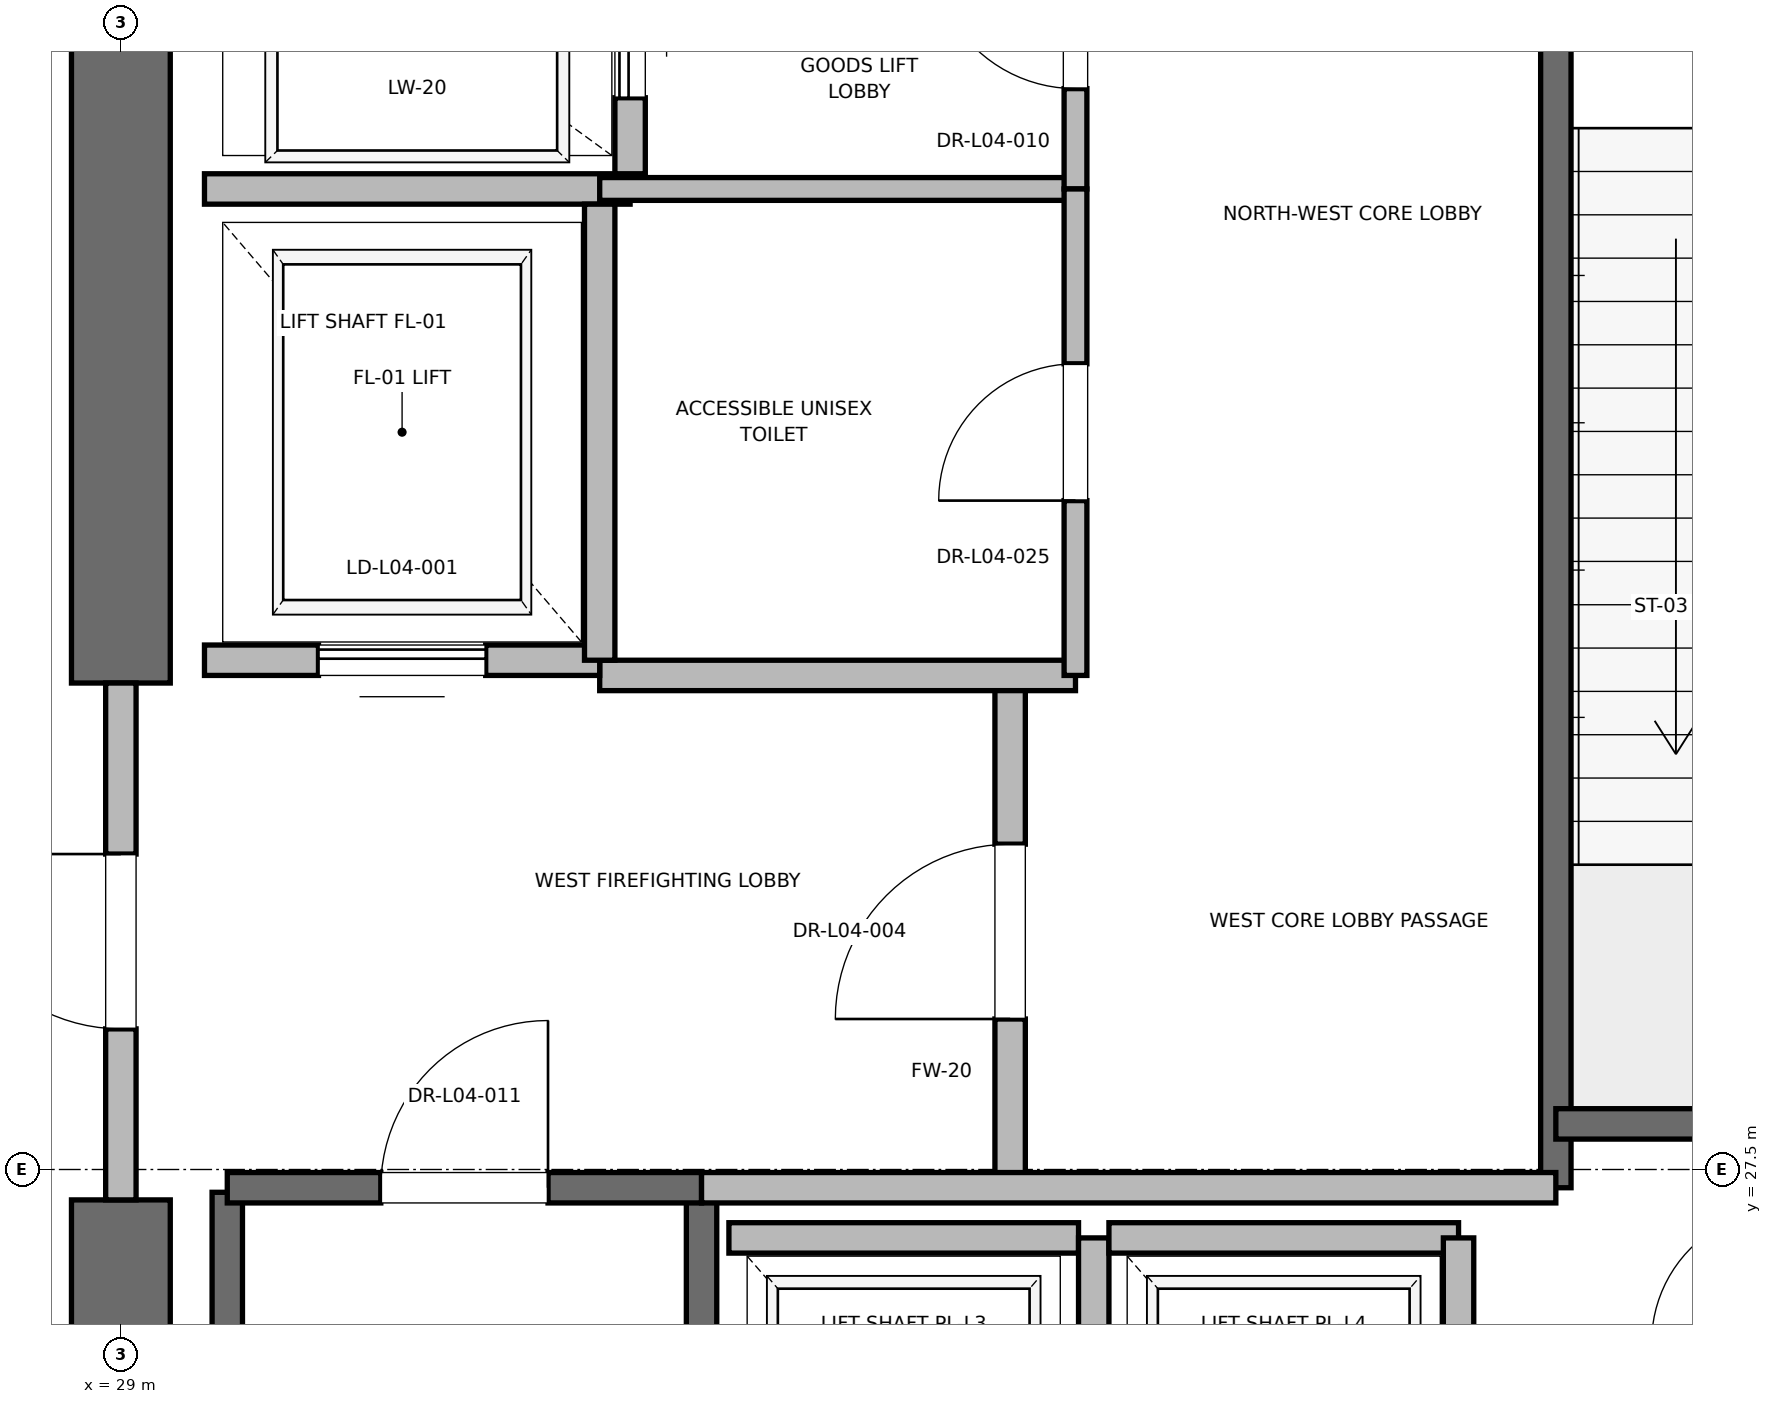
"""IFC4 building model, lengths in metres.
Left out: names, types, materials, properties, quantities, classifications, styles, units other than length and angle.
Written with IfcOpenShell. Run it as: python <this file> out.ifc"""

import sys

from ifc_helpers import new_model, si_unit, direction, frame, frame_2d, origin, place, context, subcontext, project, spatial, rectangle, extrude, element, fill, save


model = new_model("IFC4")
c1 = context("Model", 3, precision=1e-05, world=origin(), true_north=direction((0.0, 1.0)))
c2 = subcontext(c1, "Body", "Model", "MODEL_VIEW")
j1 = project(units=[si_unit("LENGTHUNIT", "METRE"), si_unit("PLANEANGLEUNIT", "RADIAN")], contexts=[c1])
p1 = place(None, origin())
s1 = spatial("IfcSite", under=j1, at=p1, CompositionType="ELEMENT")
p2 = place(p1, origin())
s2 = spatial("IfcBuilding", under=s1, at=p2, CompositionType="ELEMENT")
p3 = place(p2, frame((0.0, 0.0, 21.6)))
s3 = spatial("IfcBuildingStorey", under=s2, at=p3, CompositionType="ELEMENT", Elevation=21.6)
p4 = place(p3, frame((29.0, 18.5, 0.0), z_axis=(0.0, 0.0, 1.0), x_axis=(0.0, 1.0, 0.0)))
e1 = element("IfcWall", 1, at=p4, inside=s3, PredefinedType="SHEAR", context=c2, shape_type="SweptSolid", body=[
    extrude(rectangle(XDim=8.8, YDim=0.65, at=frame_2d((4.4, 0.0))), origin(), (0.0, 0.0, 1.0), 5.76),
])
p5 = place(p3, frame((29.0, 30.7, 0.0), z_axis=(0.0, 0.0, 1.0), x_axis=(0.0, 1.0, 0.0)))
e2 = element("IfcWall", 2, at=p5, inside=s3, PredefinedType="SHEAR", context=c2, shape_type="SweptSolid", body=[
    extrude(rectangle(XDim=5.8, YDim=0.65, at=frame_2d((2.9, 0.0))), origin(), (0.0, 0.0, 1.0), 5.76),
])
p6 = place(p3, frame((29.7, 19.2, 0.0), z_axis=(0.0, 0.0, 1.0), x_axis=(0.0, 1.0, 0.0)))
e3 = element("IfcWall", 3, at=p6, inside=s3, PredefinedType="SOLIDWALL", context=c2, shape_type="SweptSolid", body=[
    extrude(rectangle(XDim=8.15, YDim=0.2, at=frame_2d((4.075, 0.0))), origin(), (0.0, 0.0, 1.0), 5.76),
])
p7 = place(p3, frame((32.82, 18.6, 0.0), z_axis=(0.0, 0.0, 1.0), x_axis=(0.0, 1.0, 0.0)))
e4 = element("IfcWall", 4, at=p7, inside=s3, PredefinedType="SOLIDWALL", context=c2, shape_type="SweptSolid", body=[
    extrude(rectangle(XDim=8.78, YDim=0.2, at=frame_2d((4.39, 0.0))), origin(), (0.0, 0.0, 1.0), 5.76),
])
p8 = place(p3, frame((29.7, 27.38, 0.0), z_axis=(0.0, 0.0, 1.0), x_axis=(1.0, 0.0, 0.0)))
e5 = element("IfcWall", 5, at=p8, inside=s3, PredefinedType="SOLIDWALL", context=c2, shape_type="SweptSolid", body=[
    extrude(rectangle(XDim=3.12, YDim=0.2, at=frame_2d((1.56, 0.0))), origin(), (0.0, 0.0, 1.0), 5.76),
])
p9 = place(p8, frame((1.01, 0.0, 0.0)))
e6 = element("IfcOpeningElement", 6, at=p9, cuts=e5, PredefinedType="OPENING", context=c2, shape_type="SweptSolid", body=[
    extrude(rectangle(XDim=1.1, YDim=2.15, at=frame_2d((0.55, 1.075))), frame((0.0, 0.1, 0.0), z_axis=(0.0, -1.0, 0.0), x_axis=(1.0, 0.0, 0.0)), (0.0, 0.0, 1.0), 0.2),
])
p10 = place(p3, frame((38.44, 27.38, 0.0), z_axis=(0.0, 0.0, 1.0), x_axis=(0.0, 1.0, 0.0)))
e7 = element("IfcWall", 7, at=p10, inside=s3, PredefinedType="SOLIDWALL", context=c2, shape_type="SweptSolid", body=[
    extrude(rectangle(XDim=8.87, YDim=0.2, at=frame_2d((4.435, 0.0))), origin(), (0.0, 0.0, 1.0), 5.76),
])
p11 = place(p3, frame((38.44, 27.8, 0.0), z_axis=(0.0, 0.0, 1.0), x_axis=(1.0, 0.0, 0.0)))
e8 = element("IfcWall", 8, at=p11, inside=s3, PredefinedType="SOLIDWALL", context=c2, shape_type="SweptSolid", body=[
    extrude(rectangle(XDim=3.32, YDim=0.2, at=frame_2d((1.66, 0.0))), origin(), (0.0, 0.0, 1.0), 5.76),
])
p12 = place(p3, frame((34.85, 27.38, 0.0), z_axis=(0.0, 0.0, 1.0), x_axis=(0.0, 1.0, 0.0)))
e9 = element("IfcWall", 9, at=p12, inside=s3, PredefinedType="PARTITIONING", context=c2, shape_type="SweptSolid", body=[
    extrude(rectangle(XDim=3.37, YDim=0.2, at=frame_2d((1.685, 0.0))), origin(), (0.0, 0.0, 1.0), 5.76),
])
p13 = place(p12, frame((1.11, 0.0, 0.0)))
e10 = element("IfcOpeningElement", 10, at=p13, cuts=e9, PredefinedType="OPENING", context=c2, shape_type="SweptSolid", body=[
    extrude(rectangle(XDim=1.15, YDim=2.2, at=frame_2d((0.575, 1.1))), frame((0.0, 0.1, 0.0), z_axis=(0.0, -1.0, 0.0), x_axis=(1.0, 0.0, 0.0)), (0.0, 0.0, 1.0), 0.2),
])
p14 = place(p3, frame((29.0, 27.3, 0.0), z_axis=(0.0, 0.0, 1.0), x_axis=(0.0, 1.0, 0.0)))
e11 = element("IfcWall", 11, at=p14, inside=s3, PredefinedType="PARTITIONING", context=c2, shape_type="SweptSolid", body=[
    extrude(rectangle(XDim=3.4, YDim=0.2, at=frame_2d((1.7, 0.0))), origin(), (0.0, 0.0, 1.0), 4.54),
])
p15 = place(p14, frame((1.125, 0.0, 0.0)))
e12 = element("IfcOpeningElement", 12, at=p15, cuts=e11, PredefinedType="OPENING", context=c2, shape_type="SweptSolid", body=[
    extrude(rectangle(XDim=1.15, YDim=2.2, at=frame_2d((0.575, 1.1))), frame((0.0, 0.1, 0.0), z_axis=(0.0, -1.0, 0.0), x_axis=(1.0, 0.0, 0.0)), (0.0, 0.0, 1.0), 0.2),
])
p16 = place(p3, frame((32.82, 27.38, 0.0), z_axis=(0.0, 0.0, 1.0), x_axis=(1.0, 0.0, 0.0)))
e13 = element("IfcWall", 13, at=p16, inside=s3, PredefinedType="PARTITIONING", context=c2, shape_type="SweptSolid", body=[
    extrude(rectangle(XDim=5.62, YDim=0.2, at=frame_2d((2.81, 0.0))), origin(), (0.0, 0.0, 1.0), 5.76),
])
p17 = place(p3, frame((32.15, 30.75, 0.0), z_axis=(0.0, 0.0, 1.0), x_axis=(1.0, 0.0, 0.0)))
e14 = element("IfcWall", 14, at=p17, inside=s3, PredefinedType="PARTITIONING", context=c2, shape_type="SweptSolid", body=[
    extrude(rectangle(XDim=3.13, YDim=0.2, at=frame_2d((1.565, 0.0))), origin(), (0.0, 0.0, 1.0), 5.76),
])
p18 = place(p3, frame((29.55, 30.85, 0.0), z_axis=(0.0, 0.0, 1.0), x_axis=(1.0, 0.0, 0.0)))
e15 = element("IfcWall", 15, at=p18, inside=s3, PredefinedType="SOLIDWALL", context=c2, shape_type="SweptSolid", body=[
    extrude(rectangle(XDim=2.6, YDim=0.2, at=frame_2d((1.3, 0.0))), origin(), (0.0, 0.0, 1.0), 4.54),
])
p19 = place(p18, frame((0.75, 0.0, 0.0)))
e16 = element("IfcOpeningElement", 16, at=p19, cuts=e15, PredefinedType="OPENING", context=c2, shape_type="SweptSolid", body=[
    extrude(rectangle(XDim=1.1, YDim=2.2, at=frame_2d((0.55, 1.1))), frame((0.0, 0.1, 0.0), z_axis=(0.0, -1.0, 0.0), x_axis=(1.0, 0.0, 0.0)), (0.0, 0.0, 1.0), 0.2),
])
p20 = place(p3, frame((29.55, 33.95, 0.0), z_axis=(0.0, 0.0, 1.0), x_axis=(1.0, 0.0, 0.0)))
e17 = element("IfcWall", 17, at=p20, inside=s3, PredefinedType="SOLIDWALL", context=c2, shape_type="SweptSolid", body=[
    extrude(rectangle(XDim=2.8, YDim=0.2, at=frame_2d((1.4, 0.0))), origin(), (0.0, 0.0, 1.0), 5.76),
])
p21 = place(p3, frame((32.15, 30.85, 0.0), z_axis=(0.0, 0.0, 1.0), x_axis=(0.0, 1.0, 0.0)))
e18 = element("IfcWall", 18, at=p21, inside=s3, PredefinedType="SOLIDWALL", context=c2, shape_type="SweptSolid", body=[
    extrude(rectangle(XDim=3.0, YDim=0.2, at=frame_2d((1.5, 0.0))), origin(), (0.0, 0.0, 1.0), 5.76),
])
p22 = place(p3, frame((32.35, 34.05, 0.0), z_axis=(0.0, 0.0, 1.0), x_axis=(0.0, 1.0, 0.0)))
e19 = element("IfcWall", 19, at=p22, inside=s3, PredefinedType="SOLIDWALL", context=c2, shape_type="SweptSolid", body=[
    extrude(rectangle(XDim=2.1, YDim=0.2, at=frame_2d((1.05, 0.0))), origin(), (0.0, 0.0, 1.0), 5.76),
])
p23 = place(p22, frame((0.5, 0.0, 0.0)))
e20 = element("IfcOpeningElement", 20, at=p23, cuts=e19, PredefinedType="OPENING", context=c2, shape_type="SweptSolid", body=[
    extrude(rectangle(XDim=1.1, YDim=2.2, at=frame_2d((0.55, 1.1))), frame((0.0, 0.1, 0.0), z_axis=(0.0, -1.0, 0.0), x_axis=(1.0, 0.0, 0.0)), (0.0, 0.0, 1.0), 0.2),
])
p24 = place(p3, frame((35.3, 27.05, 0.0), z_axis=(0.0, 0.0, 1.0), x_axis=(-1.0, 0.0, 0.0)))
e21 = element("IfcWall", 21, at=p24, inside=s3, PredefinedType="SOLIDWALL", context=c2, shape_type="SweptSolid", body=[
    extrude(rectangle(XDim=2.3, YDim=0.2, at=frame_2d((1.15, 0.0))), origin(), (0.0, 0.0, 1.0), 5.76),
])
p25 = place(p3, frame((35.4, 24.45, 0.0), z_axis=(0.0, 0.0, 1.0), x_axis=(0.0, 1.0, 0.0)))
e22 = element("IfcWall", 22, at=p25, inside=s3, PredefinedType="SOLIDWALL", context=c2, shape_type="SweptSolid", body=[
    extrude(rectangle(XDim=2.6, YDim=0.2, at=frame_2d((1.3, 0.0))), origin(), (0.0, 0.0, 1.0), 5.76),
])
p26 = place(p3, frame((37.8, 27.05, 0.0), z_axis=(0.0, 0.0, 1.0), x_axis=(-1.0, 0.0, 0.0)))
e23 = element("IfcWall", 23, at=p26, inside=s3, PredefinedType="SOLIDWALL", context=c2, shape_type="SweptSolid", body=[
    extrude(rectangle(XDim=2.3, YDim=0.2, at=frame_2d((1.15, 0.0))), origin(), (0.0, 0.0, 1.0), 5.76),
])
p27 = place(p3, frame((37.8, 24.45, 0.0), z_axis=(0.0, 0.0, 1.0), x_axis=(0.0, 1.0, 0.0)))
e24 = element("IfcWall", 24, at=p27, inside=s3, PredefinedType="SOLIDWALL", context=c2, shape_type="SweptSolid", body=[
    extrude(rectangle(XDim=2.6, YDim=0.2, at=frame_2d((1.3, 0.0))), origin(), (0.0, 0.0, 1.0), 5.76),
])
p28 = place(p3, frame((32.15, 33.95, 0.0), z_axis=(0.0, 0.0, 1.0), x_axis=(1.0, 0.0, 0.0)))
e25 = element("IfcWall", 25, at=p28, inside=s3, PredefinedType="PARTITIONING", context=c2, shape_type="SweptSolid", body=[
    extrude(rectangle(XDim=3.13, YDim=0.15, at=frame_2d((1.565, 0.0))), origin(), (0.0, 0.0, 1.0), 2.85),
])
p29 = place(p3, frame((35.28, 33.95, 0.0), z_axis=(0.0, 0.0, 1.0), x_axis=(0.0, 1.0, 0.0)))
e26 = element("IfcWall", 26, at=p29, inside=s3, PredefinedType="PARTITIONING", context=c2, shape_type="SweptSolid", body=[
    extrude(rectangle(XDim=2.27, YDim=0.15, at=frame_2d((1.135, 0.0))), origin(), (0.0, 0.0, 1.0), 2.85),
])
p30 = place(p29, frame((0.66, 0.0, 0.0)))
e27 = element("IfcOpeningElement", 27, at=p30, cuts=e26, PredefinedType="OPENING", context=c2, shape_type="SweptSolid", body=[
    extrude(rectangle(XDim=0.95, YDim=2.15, at=frame_2d((0.475, 1.075))), frame((0.0, 0.075, 0.0), z_axis=(0.0, -1.0, 0.0), x_axis=(1.0, 0.0, 0.0)), (0.0, 0.0, 1.0), 0.15),
])
p31 = place(p3, frame((35.28, 30.75, 0.0), z_axis=(0.0, 0.0, 1.0), x_axis=(0.0, 1.0, 0.0)))
e28 = element("IfcWall", 28, at=p31, inside=s3, PredefinedType="PARTITIONING", context=c2, shape_type="SweptSolid", body=[
    extrude(rectangle(XDim=3.2, YDim=0.15, at=frame_2d((1.6, 0.0))), origin(), (0.0, 0.0, 1.0), 2.85),
])
p32 = place(p31, frame((1.15, 0.0, 0.0)))
e29 = element("IfcOpeningElement", 29, at=p32, cuts=e28, PredefinedType="OPENING", context=c2, shape_type="SweptSolid", body=[
    extrude(rectangle(XDim=0.9, YDim=2.1, at=frame_2d((0.45, 1.05))), frame((0.0, 0.075, 0.0), z_axis=(0.0, -1.0, 0.0), x_axis=(1.0, 0.0, 0.0)), (0.0, 0.0, 1.0), 0.15),
])
p33 = place(p9, origin())
e30 = element("IfcDoor", 30, at=p33, inside=s3, OperationType="SINGLE_SWING_RIGHT", PredefinedType="DOOR", context=c2, shape_type="SweptSolid", body=[
    extrude(rectangle(XDim=1.1, YDim=2.15, at=frame_2d((0.55, 1.075))), frame((0.0, 0.025, 0.0), z_axis=(0.0, -1.0, 0.0), x_axis=(1.0, 0.0, 0.0)), (0.0, 0.0, 1.0), 0.05),
])
fill(e6, e30)
p34 = place(p13, origin())
e31 = element("IfcDoor", 31, at=p34, inside=s3, OperationType="SINGLE_SWING_LEFT", PredefinedType="DOOR", context=c2, shape_type="SweptSolid", body=[
    extrude(rectangle(XDim=1.15, YDim=2.2, at=frame_2d((0.575, 1.1))), frame((0.0, 0.025, 0.0), z_axis=(0.0, -1.0, 0.0), x_axis=(1.0, 0.0, 0.0)), (0.0, 0.0, 1.0), 0.05),
])
fill(e10, e31)
p35 = place(p15, origin())
e32 = element("IfcDoor", 32, at=p35, inside=s3, OperationType="SINGLE_SWING_RIGHT", PredefinedType="DOOR", context=c2, shape_type="SweptSolid", body=[
    extrude(rectangle(XDim=1.15, YDim=2.2, at=frame_2d((0.575, 1.1))), frame((0.0, 0.025, 0.0), z_axis=(0.0, -1.0, 0.0), x_axis=(1.0, 0.0, 0.0)), (0.0, 0.0, 1.0), 0.05),
])
fill(e12, e32)
p36 = place(p19, origin())
e33 = element("IfcDoor", 33, at=p36, inside=s3, OperationType="SLIDING_TO_RIGHT", PredefinedType="DOOR", context=c2, shape_type="SweptSolid", body=[
    extrude(rectangle(XDim=1.1, YDim=2.2, at=frame_2d((0.55, 1.1))), frame((0.0, 0.025, 0.0), z_axis=(0.0, -1.0, 0.0), x_axis=(1.0, 0.0, 0.0)), (0.0, 0.0, 1.0), 0.05),
])
fill(e16, e33)
p37 = place(p23, origin())
e34 = element("IfcDoor", 34, at=p37, inside=s3, OperationType="SLIDING_TO_RIGHT", PredefinedType="DOOR", context=c2, shape_type="SweptSolid", body=[
    extrude(rectangle(XDim=1.1, YDim=2.2, at=frame_2d((0.55, 1.1))), frame((0.0, 0.025, 0.0), z_axis=(0.0, -1.0, 0.0), x_axis=(1.0, 0.0, 0.0)), (0.0, 0.0, 1.0), 0.05),
])
fill(e20, e34)
p38 = place(p30, origin())
e35 = element("IfcDoor", 35, at=p38, inside=s3, OperationType="SINGLE_SWING_RIGHT", PredefinedType="DOOR", context=c2, shape_type="SweptSolid", body=[
    extrude(rectangle(XDim=0.95, YDim=2.15, at=frame_2d((0.475, 1.075))), frame((0.0, 0.025, 0.0), z_axis=(0.0, -1.0, 0.0), x_axis=(1.0, 0.0, 0.0)), (0.0, 0.0, 1.0), 0.05),
])
fill(e27, e35)
p39 = place(p32, origin())
e36 = element("IfcDoor", 36, at=p39, inside=s3, OperationType="SINGLE_SWING_LEFT", PredefinedType="DOOR", context=c2, shape_type="SweptSolid", body=[
    extrude(rectangle(XDim=0.9, YDim=2.1, at=frame_2d((0.45, 1.05))), frame((0.0, 0.025, 0.0), z_axis=(0.0, -1.0, 0.0), x_axis=(1.0, 0.0, 0.0)), (0.0, 0.0, 1.0), 0.05),
])
fill(e29, e36)
save(model, sys.argv[1])
